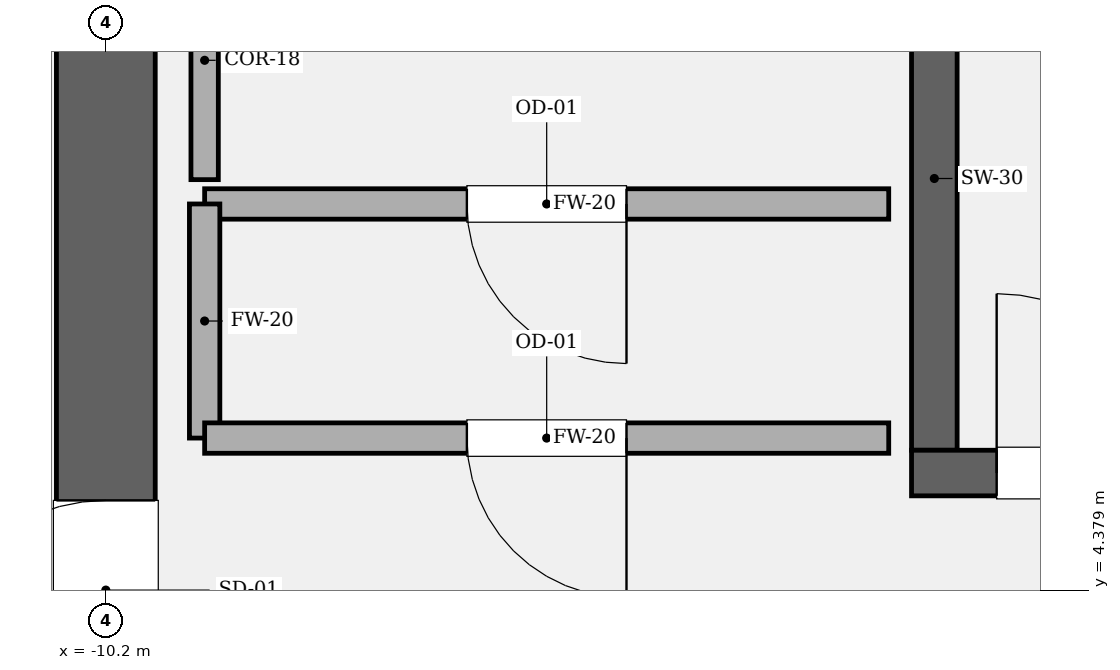
"""IFC4 building model, lengths in metres.
Left out: names, types, materials, properties, quantities, classifications, styles, units other than length and angle.
Written with IfcOpenShell. Run it as: python <this file> out.ifc"""

import sys

from ifc_helpers import new_model, si_unit, direction, frame, frame_2d, origin, place, context, subcontext, project, spatial, rectangle, extrude, element, fill, save


model = new_model("IFC4")
c1 = context("Model", 3, precision=1e-05, world=origin(), true_north=direction((0.0, 1.0)))
c2 = subcontext(c1, "Body", "Model", "MODEL_VIEW")
j1 = project(units=[si_unit("LENGTHUNIT", "METRE"), si_unit("PLANEANGLEUNIT", "RADIAN")], contexts=[c1])
p1 = place(None, origin())
s1 = spatial("IfcSite", under=j1, at=p1, CompositionType="ELEMENT")
p2 = place(p1, origin())
s2 = spatial("IfcBuilding", under=s1, at=p2, CompositionType="ELEMENT")
p3 = place(p2, frame((0.0, 0.0, 192.45)))
s3 = spatial("IfcBuildingStorey", under=s2, at=p3, CompositionType="ELEMENT", Elevation=192.45)
p4 = place(p3, frame((-10.2, -8.875, 0.0), z_axis=(0.0, 0.0, 1.0), x_axis=(0.0, 1.0, 0.0)))
e1 = element("IfcWall", 1, at=p4, inside=s3, PredefinedType="SHEAR", context=c2, shape_type="SweptSolid", body=[
    extrude(rectangle(XDim=17.75, YDim=0.65, at=frame_2d((8.875, 0.0))), origin(), (0.0, 0.0, 1.0), 4.05),
])
p5 = place(p4, frame((12.665, 0.0, 0.0)))
e2 = element("IfcOpeningElement", 2, at=p5, cuts=e1, PredefinedType="OPENING", context=c2, shape_type="SweptSolid", body=[
    extrude(rectangle(XDim=1.18, YDim=2.2, at=frame_2d((0.59, 1.1))), frame((0.0, 0.335, 0.0), z_axis=(0.0, -1.0, 0.0), x_axis=(1.0, 0.0, 0.0)), (0.0, 0.0, 1.0), 0.67),
])
p6 = place(p3, frame((-4.75, 5.3, 0.0), z_axis=(0.0, 0.0, 1.0), x_axis=(0.0, 1.0, 0.0)))
e3 = element("IfcWall", 3, at=p6, inside=s3, PredefinedType="SOLIDWALL", context=c2, shape_type="SweptSolid", body=[
    extrude(rectangle(XDim=3.575, YDim=0.3, at=frame_2d((1.788, 0.0))), origin(), (0.0, 0.0, 1.0), 4.05),
])
p7 = place(p3, frame((-4.9, 5.15, 0.0), z_axis=(0.0, 0.0, 1.0), x_axis=(1.0, 0.0, 0.0)))
e4 = element("IfcWall", 4, at=p7, inside=s3, PredefinedType="SOLIDWALL", context=c2, shape_type="SweptSolid", body=[
    extrude(rectangle(XDim=9.8, YDim=0.3, at=frame_2d((4.9, 0.0))), origin(), (0.0, 0.0, 1.0), 4.05),
])
p8 = place(p7, frame((0.56, 0.0, 0.0)))
e5 = element("IfcOpeningElement", 5, at=p8, cuts=e4, PredefinedType="OPENING", context=c2, shape_type="SweptSolid", body=[
    extrude(rectangle(XDim=1.18, YDim=2.2, at=frame_2d((0.59, 1.1))), frame((0.0, 0.16, 0.0), z_axis=(0.0, -1.0, 0.0), x_axis=(1.0, 0.0, 0.0)), (0.0, 0.0, 1.0), 0.32),
])
p9 = place(p3, frame((-5.05, 6.92, 0.0), z_axis=(0.0, 0.0, 1.0), x_axis=(-1.0, 0.0, 0.0)))
e6 = element("IfcWall", 6, at=p9, inside=s3, PredefinedType="SOLIDWALL", context=c2, shape_type="SweptSolid", body=[
    extrude(rectangle(XDim=4.5, YDim=0.2, at=frame_2d((2.25, 0.0))), origin(), (0.0, 0.0, 1.0), 3.83),
])
p10 = place(p9, frame((1.725, 0.0, 0.0)))
e7 = element("IfcOpeningElement", 7, at=p10, cuts=e6, PredefinedType="OPENING", context=c2, shape_type="SweptSolid", body=[
    extrude(rectangle(XDim=1.05, YDim=2.2, at=frame_2d((0.525, 1.1))), frame((0.0, 0.11, 0.0), z_axis=(0.0, -1.0, 0.0), x_axis=(1.0, 0.0, 0.0)), (0.0, 0.0, 1.0), 0.22),
])
p11 = place(p3, frame((-9.55, 6.92, 0.0), z_axis=(0.0, 0.0, 1.0), x_axis=(0.0, -1.0, 0.0)))
e8 = element("IfcWall", 8, at=p11, inside=s3, PredefinedType="SOLIDWALL", context=c2, shape_type="SweptSolid", body=[
    extrude(rectangle(XDim=1.54, YDim=0.2, at=frame_2d((0.77, 0.0))), origin(), (0.0, 0.0, 1.0), 3.83),
])
p12 = place(p3, frame((-9.55, 5.38, 0.0), z_axis=(0.0, 0.0, 1.0), x_axis=(1.0, 0.0, 0.0)))
e9 = element("IfcWall", 9, at=p12, inside=s3, PredefinedType="SOLIDWALL", context=c2, shape_type="SweptSolid", body=[
    extrude(rectangle(XDim=4.5, YDim=0.2, at=frame_2d((2.25, 0.0))), origin(), (0.0, 0.0, 1.0), 3.83),
])
p13 = place(p12, frame((1.725, 0.0, 0.0)))
e10 = element("IfcOpeningElement", 10, at=p13, cuts=e9, PredefinedType="OPENING", context=c2, shape_type="SweptSolid", body=[
    extrude(rectangle(XDim=1.05, YDim=2.2, at=frame_2d((0.525, 1.1))), frame((0.0, 0.11, 0.0), z_axis=(0.0, -1.0, 0.0), x_axis=(1.0, 0.0, 0.0)), (0.0, 0.0, 1.0), 0.22),
])
p14 = place(p3, frame((-9.55, 8.65, 0.0), z_axis=(0.0, 0.0, 1.0), x_axis=(0.0, -1.0, 0.0)))
e11 = element("IfcWall", 11, at=p14, inside=s3, PredefinedType="PARTITIONING", context=c2, shape_type="SweptSolid", body=[
    extrude(rectangle(XDim=1.57, YDim=0.18, at=frame_2d((0.785, 0.0))), origin(), (0.0, 0.0, 1.0), 3.83),
])
p15 = place(p8, origin())
e12 = element("IfcDoor", 12, at=p15, inside=s3, OperationType="SINGLE_SWING_LEFT", PredefinedType="DOOR", context=c2, shape_type="SweptSolid", body=[
    extrude(rectangle(XDim=1.18, YDim=2.2, at=frame_2d((0.59, 1.1))), frame((0.0, 0.025, 0.0), z_axis=(0.0, -1.0, 0.0), x_axis=(1.0, 0.0, 0.0)), (0.0, 0.0, 1.0), 0.05),
])
fill(e5, e12)
p16 = place(p5, origin())
e13 = element("IfcDoor", 13, at=p16, inside=s3, OperationType="SINGLE_SWING_LEFT", PredefinedType="DOOR", context=c2, shape_type="SweptSolid", body=[
    extrude(rectangle(XDim=1.18, YDim=2.2, at=frame_2d((0.59, 1.1))), frame((0.0, 0.025, 0.0), z_axis=(0.0, -1.0, 0.0), x_axis=(1.0, 0.0, 0.0)), (0.0, 0.0, 1.0), 0.05),
])
fill(e2, e13)
p17 = place(p13, origin())
e14 = element("IfcDoor", 14, at=p17, inside=s3, OperationType="SINGLE_SWING_RIGHT", PredefinedType="DOOR", context=c2, shape_type="SweptSolid", body=[
    extrude(rectangle(XDim=1.05, YDim=2.2, at=frame_2d((0.525, 1.1))), frame((0.0, 0.025, 0.0), z_axis=(0.0, -1.0, 0.0), x_axis=(1.0, 0.0, 0.0)), (0.0, 0.0, 1.0), 0.05),
])
fill(e10, e14)
p18 = place(p10, origin())
e15 = element("IfcDoor", 15, at=p18, inside=s3, OperationType="SINGLE_SWING_LEFT", PredefinedType="DOOR", context=c2, shape_type="SweptSolid", body=[
    extrude(rectangle(XDim=1.05, YDim=2.2, at=frame_2d((0.525, 1.1))), frame((0.0, 0.025, 0.0), z_axis=(0.0, -1.0, 0.0), x_axis=(1.0, 0.0, 0.0)), (0.0, 0.0, 1.0), 0.05),
])
fill(e7, e15)
save(model, sys.argv[1])
